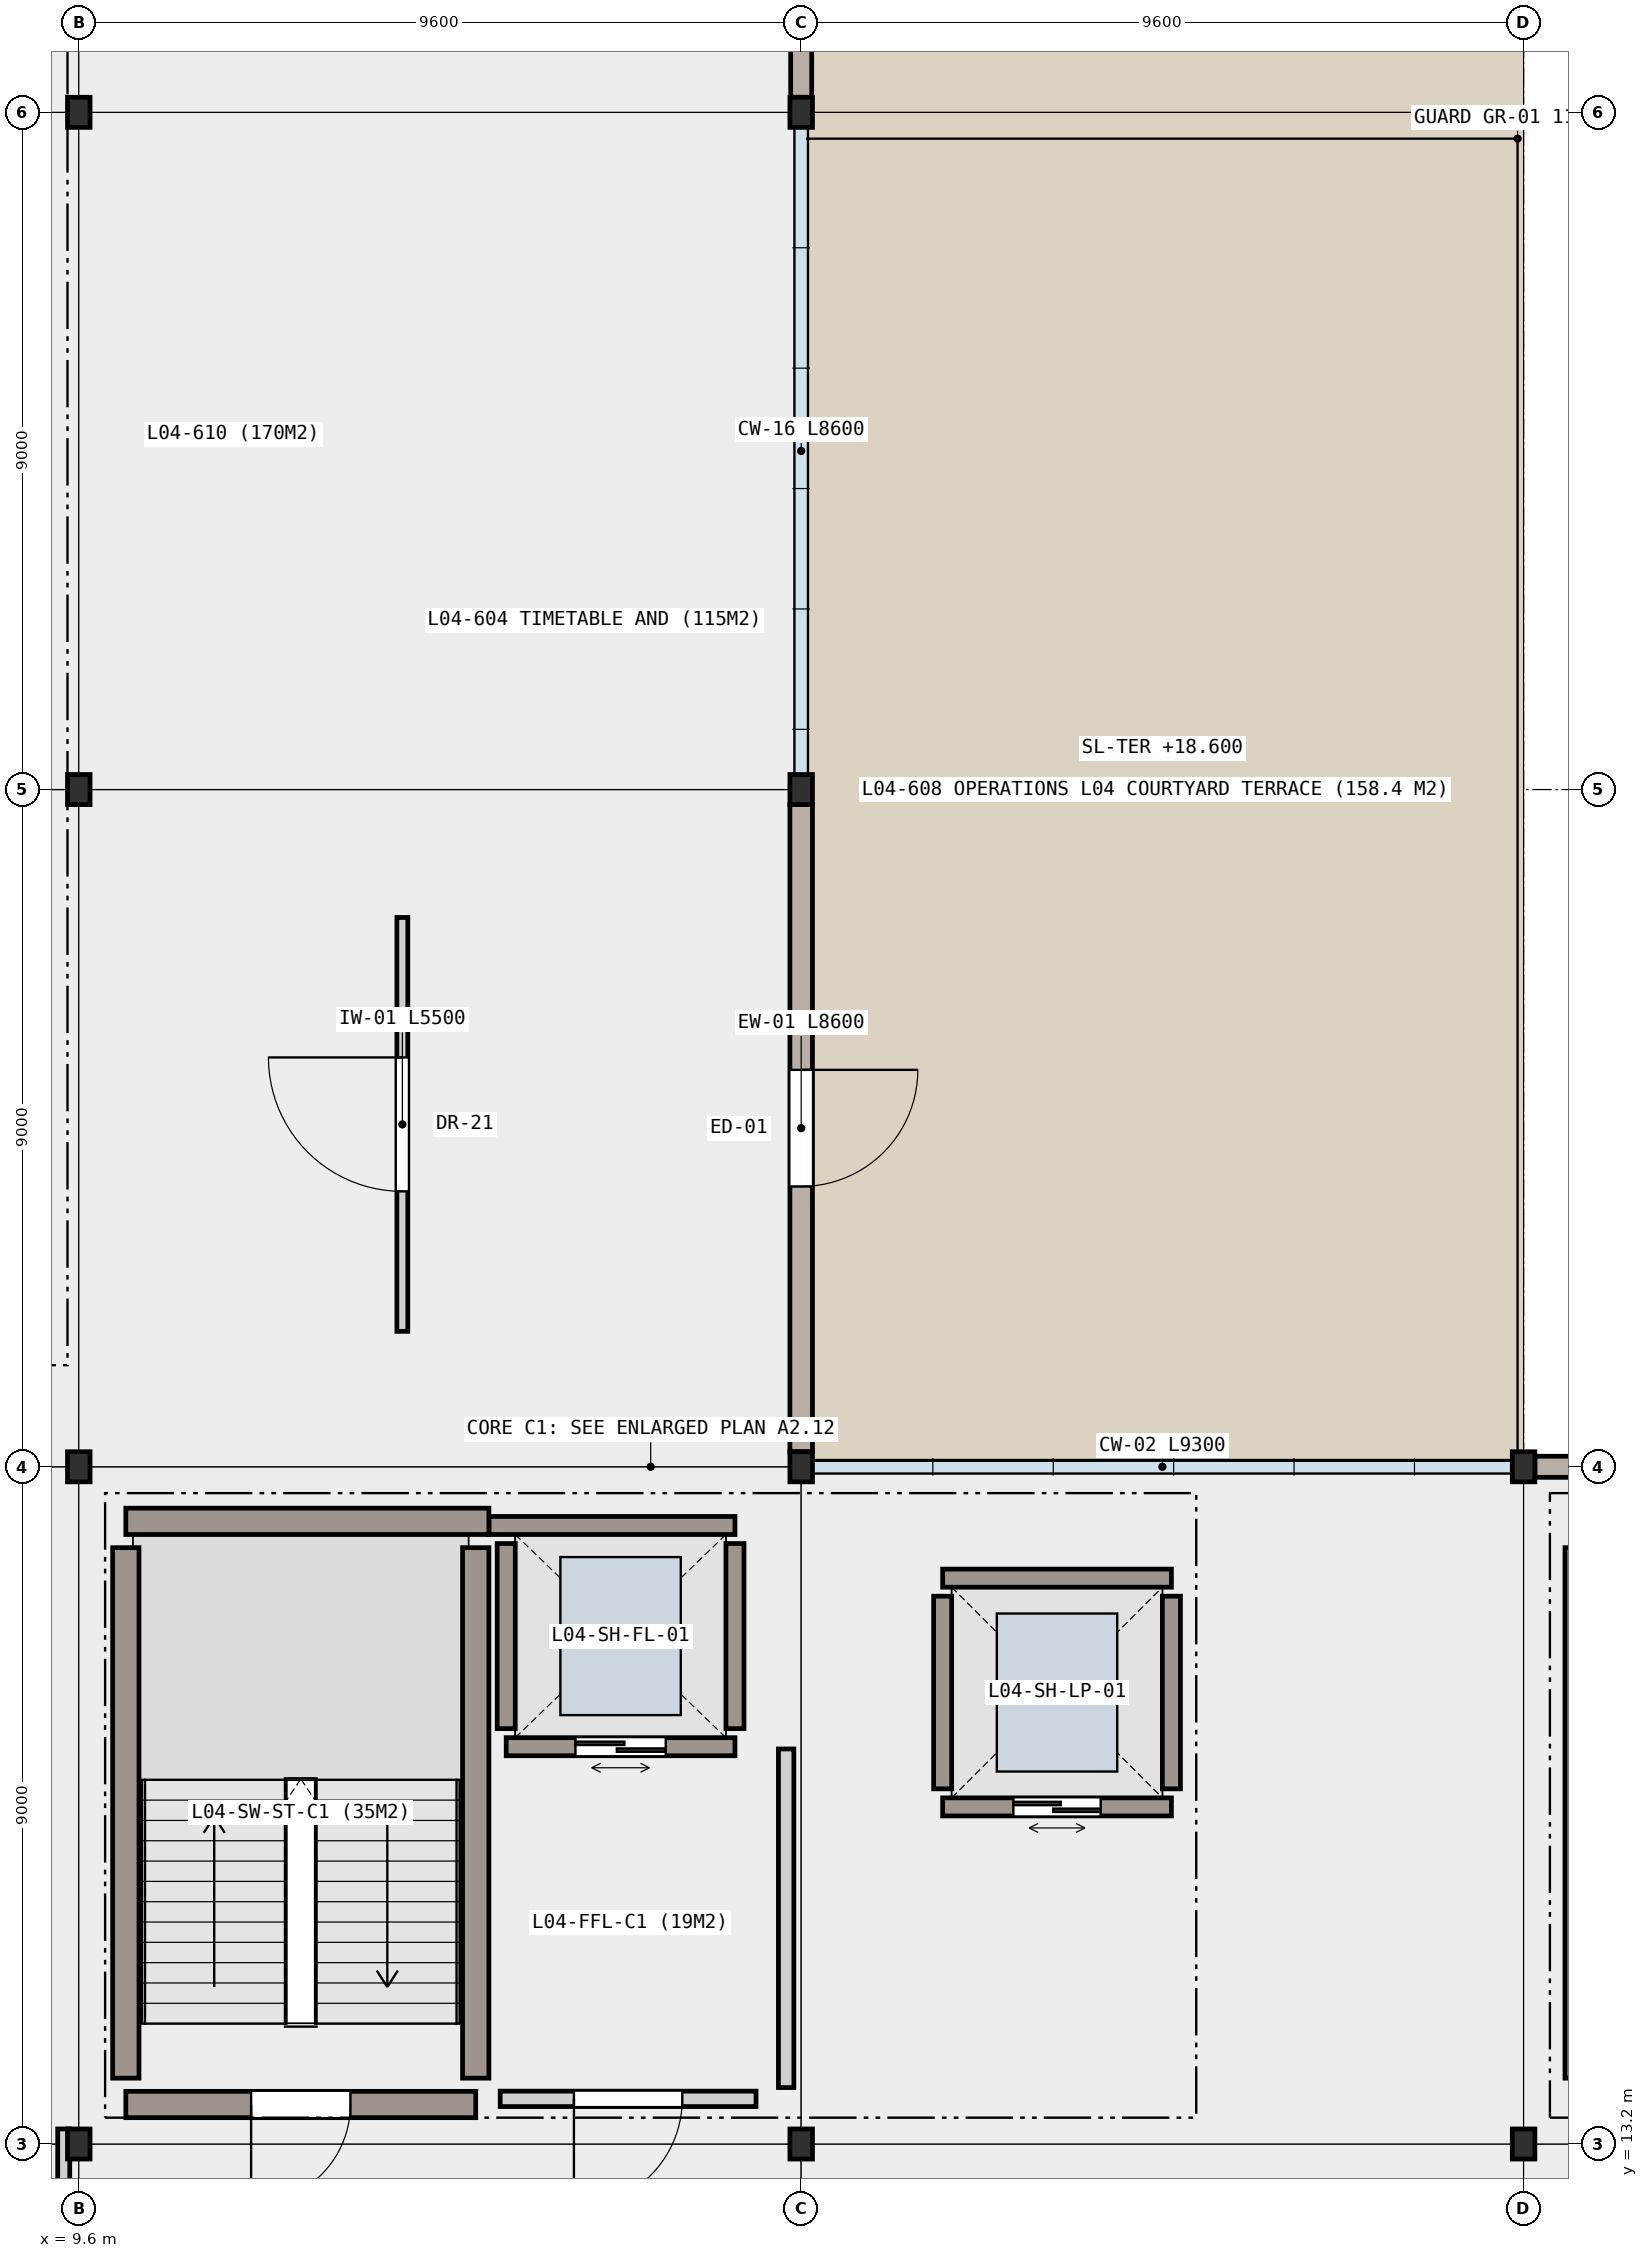
"""IFC4 building model, lengths in metres.
Left out: names, types, materials, properties, quantities, classifications, styles, units other than length and angle.
Written with IfcOpenShell. Run it as: python <this file> out.ifc"""

import sys

from ifc_helpers import new_model, si_unit, direction, frame, frame_2d, origin, origin_2d, place, context, subcontext, project, spatial, rectangle, i_section, extrude, element, fill, save


model = new_model("IFC4")
c1 = context("Model", 3, precision=1e-05, world=origin(), true_north=direction((0.0, 1.0)))
c2 = subcontext(c1, "Body", "Model", "MODEL_VIEW")
j1 = project(units=[si_unit("LENGTHUNIT", "METRE"), si_unit("PLANEANGLEUNIT", "RADIAN")], contexts=[c1])
p1 = place(None, origin())
s1 = spatial("IfcSite", under=j1, at=p1, CompositionType="ELEMENT")
p2 = place(p1, origin())
s2 = spatial("IfcBuilding", under=s1, at=p2, CompositionType="ELEMENT")
p3 = place(p2, frame((0.0, 0.0, 18.6)))
s3 = spatial("IfcBuildingStorey", under=s2, at=p3, CompositionType="ELEMENT", Elevation=18.6)
for number, where, z_axis, x_axis in (
    (1, (9.6, 13.2, 0.0), (0.0, 0.0, 1.0), (1.0, 0.0, 0.0)),
    (2, (9.6, 22.2, 0.0), (0.0, 0.0, 1.0), (1.0, 0.0, 0.0)),
    (3, (9.6, 31.2, 0.0), (0.0, 0.0, 1.0), (1.0, 0.0, 0.0)),
    (4, (9.6, 40.2, 0.0), (0.0, 0.0, 1.0), (1.0, 0.0, 0.0)),
    (5, (19.2, 13.2, 0.0), (0.0, 0.0, 1.0), (1.0, 0.0, 0.0)),
    (6, (19.2, 22.2, 0.0), (0.0, 0.0, 1.0), (1.0, 0.0, 0.0)),
    (7, (19.2, 31.2, 0.0), (0.0, 0.0, 1.0), (1.0, 0.0, 0.0)),
    (8, (19.2, 40.2, 0.0), (0.0, 0.0, 1.0), (1.0, 0.0, 0.0)),
    (9, (28.8, 13.2, 0.0), (0.0, 0.0, 1.0), (1.0, 0.0, 0.0)),
    (10, (28.8, 22.2, 0.0), (0.0, 0.0, 1.0), (1.0, 0.0, 0.0)),
):
    element("IfcColumn", number, at=place(p3, frame(where, z_axis=z_axis, x_axis=x_axis)), inside=s3, PredefinedType="COLUMN", context=c2, shape_type="SweptSolid", body=[
        extrude(i_section(OverallWidth=0.3, OverallDepth=0.4, WebThickness=0.013, FlangeThickness=0.024, FilletRadius=0.027, at=origin_2d()), origin(), (0.0, 0.0, 1.0), 4.2),
    ])
p4 = place(p3, frame((19.2, 49.0, 0.0), z_axis=(0.0, 0.0, 1.0), x_axis=(0.0, -1.0, 0.0)))
e11 = element("IfcWall", 11, at=p4, inside=s3, PredefinedType="SOLIDWALL", context=c2, shape_type="SweptSolid", body=[
    extrude(rectangle(XDim=8.6, YDim=0.28, at=frame_2d((4.3, 0.0))), origin(), (0.0, 0.0, 1.0), 3.38),
])
p5 = place(p4, frame((0.75, 0.0, 0.85)))
e12 = element("IfcOpeningElement", 12, at=p5, cuts=e11, PredefinedType="OPENING", context=c2, shape_type="SweptSolid", body=[
    extrude(rectangle(XDim=2.8, YDim=1.5, at=frame_2d((1.4, 0.75))), frame((0.0, 0.15, 0.0), z_axis=(0.0, -1.0, 0.0), x_axis=(1.0, 0.0, 0.0)), (0.0, 0.0, 1.0), 0.3),
])
p6 = place(p4, frame((5.05, 0.0, 0.85)))
e13 = element("IfcOpeningElement", 13, at=p6, cuts=e11, PredefinedType="OPENING", context=c2, shape_type="SweptSolid", body=[
    extrude(rectangle(XDim=2.8, YDim=1.85, at=frame_2d((1.4, 0.925))), frame((0.0, 0.15, 0.0), z_axis=(0.0, -1.0, 0.0), x_axis=(1.0, 0.0, 0.0)), (0.0, 0.0, 1.0), 0.3),
])
p7 = place(p3, frame((19.2, 31.0, 0.0), z_axis=(0.0, 0.0, 1.0), x_axis=(0.0, -1.0, 0.0)))
e14 = element("IfcWall", 14, at=p7, inside=s3, PredefinedType="SOLIDWALL", context=c2, shape_type="SweptSolid", body=[
    extrude(rectangle(XDim=8.6, YDim=0.3, at=frame_2d((4.3, 0.0))), origin(), (0.0, 0.0, 1.0), 3.38),
])
p8 = place(p7, frame((3.525, 0.0, 0.0)))
e15 = element("IfcOpeningElement", 15, at=p8, cuts=e14, PredefinedType="OPENING", context=c2, shape_type="SweptSolid", body=[
    extrude(rectangle(XDim=1.55, YDim=2.25, at=frame_2d((0.775, 1.125))), frame((0.0, 0.16, 0.0), z_axis=(0.0, -1.0, 0.0), x_axis=(1.0, 0.0, 0.0)), (0.0, 0.0, 1.0), 0.32),
])
p9 = place(p3, frame((28.95, 22.2, 0.0), z_axis=(0.0, 0.0, 1.0), x_axis=(1.0, 0.0, 0.0)))
e16 = element("IfcWall", 16, at=p9, inside=s3, PredefinedType="SOLIDWALL", context=c2, shape_type="SweptSolid", body=[
    extrude(rectangle(XDim=9.3, YDim=0.28, at=frame_2d((4.65, 0.0))), origin(), (0.0, 0.0, 1.0), 3.33),
])
p10 = place(p9, frame((0.925, 0.0, 0.85)))
e17 = element("IfcOpeningElement", 17, at=p10, cuts=e16, PredefinedType="OPENING", context=c2, shape_type="SweptSolid", body=[
    extrude(rectangle(XDim=2.8, YDim=2.15, at=frame_2d((1.4, 1.075))), frame((0.0, 0.15, 0.0), z_axis=(0.0, -1.0, 0.0), x_axis=(1.0, 0.0, 0.0)), (0.0, 0.0, 1.0), 0.3),
])
p11 = place(p9, frame((5.5, 0.0, 0.85)))
e18 = element("IfcOpeningElement", 18, at=p11, cuts=e16, PredefinedType="OPENING", context=c2, shape_type="SweptSolid", body=[
    extrude(rectangle(XDim=2.95, YDim=1.5, at=frame_2d((1.475, 0.75))), frame((0.0, 0.15, 0.0), z_axis=(0.0, -1.0, 0.0), x_axis=(1.0, 0.0, 0.0)), (0.0, 0.0, 1.0), 0.3),
])
p12 = place(p3, frame((18.32, 18.48, 0.0), z_axis=(0.0, 0.0, 1.0), x_axis=(-1.0, 0.0, 0.0)))
e19 = element("IfcWall", 19, at=p12, inside=s3, PredefinedType="SHEAR", context=c2, shape_type="SweptSolid", body=[
    extrude(rectangle(XDim=3.04, YDim=0.24, at=frame_2d((1.52, 0.0))), origin(), (0.0, 0.0, 1.0), 3.96),
])
p13 = place(p12, frame((0.92, 0.0, 0.0)))
e20 = element("IfcOpeningElement", 20, at=p13, cuts=e19, PredefinedType="OPENING", context=c2, shape_type="SweptSolid", body=[
    extrude(rectangle(XDim=1.2, YDim=2.15, at=frame_2d((0.6, 1.075))), frame((0.0, 0.13, 0.0), z_axis=(0.0, -1.0, 0.0), x_axis=(1.0, 0.0, 0.0)), (0.0, 0.0, 1.0), 0.26),
])
p14 = place(p3, frame((15.05, 21.42, 0.0), z_axis=(0.0, 0.0, 1.0), x_axis=(1.0, 0.0, 0.0)))
e21 = element("IfcWall", 21, at=p14, inside=s3, PredefinedType="SHEAR", context=c2, shape_type="SweptSolid", body=[
    extrude(rectangle(XDim=3.27, YDim=0.24, at=frame_2d((1.635, 0.0))), origin(), (0.0, 0.0, 1.0), 3.96),
])
for number, where, z_axis, x_axis in (
    (22, (15.28, 18.72, 0.0), (0.0, 0.0, 1.0), (0.0, 1.0, 0.0)),
    (23, (18.32, 21.18, 0.0), (0.0, 0.0, 1.0), (0.0, -1.0, 0.0)),
):
    element("IfcWall", number, at=place(p3, frame(where, z_axis=z_axis, x_axis=x_axis)), inside=s3, PredefinedType="SHEAR", context=c2, shape_type="SweptSolid", body=[
        extrude(rectangle(XDim=2.46, YDim=0.24, at=frame_2d((1.23, 0.0))), origin(), (0.0, 0.0, 1.0), 3.96),
    ])
p15 = place(p3, frame((24.12, 17.68, 0.0), z_axis=(0.0, 0.0, 1.0), x_axis=(-1.0, 0.0, 0.0)))
e24 = element("IfcWall", 24, at=p15, inside=s3, PredefinedType="SHEAR", context=c2, shape_type="SweptSolid", body=[
    extrude(rectangle(XDim=3.04, YDim=0.24, at=frame_2d((1.52, 0.0))), origin(), (0.0, 0.0, 1.0), 3.96),
])
p16 = place(p15, frame((0.94, 0.0, 0.0)))
e25 = element("IfcOpeningElement", 25, at=p16, cuts=e24, PredefinedType="OPENING", context=c2, shape_type="SweptSolid", body=[
    extrude(rectangle(XDim=1.16, YDim=2.15, at=frame_2d((0.58, 1.075))), frame((0.0, 0.13, 0.0), z_axis=(0.0, -1.0, 0.0), x_axis=(1.0, 0.0, 0.0)), (0.0, 0.0, 1.0), 0.26),
])
p17 = place(p3, frame((21.08, 20.72, 0.0), z_axis=(0.0, 0.0, 1.0), x_axis=(1.0, 0.0, 0.0)))
e26 = element("IfcWall", 26, at=p17, inside=s3, PredefinedType="SHEAR", context=c2, shape_type="SweptSolid", body=[
    extrude(rectangle(XDim=3.04, YDim=0.24, at=frame_2d((1.52, 0.0))), origin(), (0.0, 0.0, 1.0), 3.96),
])
for number, where, z_axis, x_axis in (
    (27, (21.08, 17.92, 0.0), (0.0, 0.0, 1.0), (0.0, 1.0, 0.0)),
    (28, (24.12, 20.48, 0.0), (0.0, 0.0, 1.0), (0.0, -1.0, 0.0)),
):
    element("IfcWall", number, at=place(p3, frame(where, z_axis=z_axis, x_axis=x_axis)), inside=s3, PredefinedType="SHEAR", context=c2, shape_type="SweptSolid", body=[
        extrude(rectangle(XDim=2.56, YDim=0.24, at=frame_2d((1.28, 0.0))), origin(), (0.0, 0.0, 1.0), 3.96),
    ])
p18 = place(p3, frame((14.875, 13.725, 0.0), z_axis=(0.0, 0.0, 1.0), x_axis=(-1.0, 0.0, 0.0)))
e29 = element("IfcWall", 29, at=p18, inside=s3, PredefinedType="SHEAR", context=c2, shape_type="SweptSolid", body=[
    extrude(rectangle(XDim=4.65, YDim=0.35, at=frame_2d((2.325, 0.0))), origin(), (0.0, 0.0, 1.0), 3.96),
])
p19 = place(p18, frame((1.665, 0.0, 0.0)))
e30 = element("IfcOpeningElement", 30, at=p19, cuts=e29, PredefinedType="OPENING", context=c2, shape_type="SweptSolid", body=[
    extrude(rectangle(XDim=1.32, YDim=2.15, at=frame_2d((0.66, 1.075))), frame((0.0, 0.185, 0.0), z_axis=(0.0, -1.0, 0.0), x_axis=(1.0, 0.0, 0.0)), (0.0, 0.0, 1.0), 0.37),
])
p20 = place(p3, frame((10.225, 21.475, 0.0), z_axis=(0.0, 0.0, 1.0), x_axis=(1.0, 0.0, 0.0)))
e31 = element("IfcWall", 31, at=p20, inside=s3, PredefinedType="SHEAR", context=c2, shape_type="SweptSolid", body=[
    extrude(rectangle(XDim=4.825, YDim=0.35, at=frame_2d((2.413, 0.0))), origin(), (0.0, 0.0, 1.0), 3.96),
])
for number, where, z_axis, x_axis in (
    (32, (10.225, 14.075, 0.0), (0.0, 0.0, 1.0), (0.0, 1.0, 0.0)),
    (33, (14.875, 21.125, 0.0), (0.0, 0.0, 1.0), (0.0, -1.0, 0.0)),
    (34, (29.525, 14.075, 0.0), (0.0, 0.0, 1.0), (0.0, 1.0, 0.0)),
):
    element("IfcWall", number, at=place(p3, frame(where, z_axis=z_axis, x_axis=x_axis)), inside=s3, PredefinedType="SHEAR", context=c2, shape_type="SweptSolid", body=[
        extrude(rectangle(XDim=7.05, YDim=0.35, at=frame_2d((3.525, 0.0))), origin(), (0.0, 0.0, 1.0), 3.96),
    ])
p21 = place(p3, frame((18.6, 13.8, 0.0), z_axis=(0.0, 0.0, 1.0), x_axis=(-1.0, 0.0, 0.0)))
e35 = element("IfcWall", 35, at=p21, inside=s3, PredefinedType="PARTITIONING", context=c2, shape_type="SweptSolid", body=[
    extrude(rectangle(XDim=3.4, YDim=0.205, at=frame_2d((1.7, 0.0))), origin(), (0.0, 0.0, 1.0), 3.96),
])
p22 = place(p21, frame((0.98, 0.0, 0.0)))
e36 = element("IfcOpeningElement", 36, at=p22, cuts=e35, PredefinedType="OPENING", context=c2, shape_type="SweptSolid", body=[
    extrude(rectangle(XDim=1.44, YDim=2.18, at=frame_2d((0.72, 1.09))), frame((0.0, 0.113, 0.0), z_axis=(0.0, -1.0, 0.0), x_axis=(1.0, 0.0, 0.0)), (0.0, 0.0, 1.0), 0.225),
])
p23 = place(p3, frame((19.0, 18.45, 0.0), z_axis=(0.0, 0.0, 1.0), x_axis=(0.0, -1.0, 0.0)))
e37 = element("IfcWall", 37, at=p23, inside=s3, PredefinedType="PARTITIONING", context=c2, shape_type="SweptSolid", body=[
    extrude(rectangle(XDim=4.5, YDim=0.205, at=frame_2d((2.25, 0.0))), origin(), (0.0, 0.0, 1.0), 3.38),
])
p24 = place(p3, frame((9.4, 13.4, 0.0), z_axis=(0.0, 0.0, 1.0), x_axis=(0.0, -1.0, 0.0)))
e38 = element("IfcWall", 38, at=p24, inside=s3, PredefinedType="PARTITIONING", context=c2, shape_type="SweptSolid", body=[
    extrude(rectangle(XDim=3.4, YDim=0.16, at=frame_2d((1.7, 0.0))), origin(), (0.0, 0.0, 1.0), 3.43),
])
p25 = place(p24, frame((0.85, 0.0, 0.0)))
e39 = element("IfcOpeningElement", 39, at=p25, cuts=e38, PredefinedType="OPENING", context=c2, shape_type="SweptSolid", body=[
    extrude(rectangle(XDim=1.7, YDim=2.22, at=frame_2d((0.85, 1.11))), frame((0.0, 0.09, 0.0), z_axis=(0.0, -1.0, 0.0), x_axis=(1.0, 0.0, 0.0)), (0.0, 0.0, 1.0), 0.18),
])
p26 = place(p3, frame((13.9, 24.0, 0.0), z_axis=(0.0, 0.0, 1.0), x_axis=(0.0, 1.0, 0.0)))
e40 = element("IfcWall", 40, at=p26, inside=s3, PredefinedType="PARTITIONING", context=c2, shape_type="SweptSolid", body=[
    extrude(rectangle(XDim=5.5, YDim=0.145, at=frame_2d((2.75, 0.0))), origin(), (0.0, 0.0, 1.0), 3.96),
])
p27 = place(p26, frame((1.86, 0.0, 0.0)))
e41 = element("IfcOpeningElement", 41, at=p27, cuts=e40, PredefinedType="OPENING", context=c2, shape_type="SweptSolid", body=[
    extrude(rectangle(XDim=1.78, YDim=2.24, at=frame_2d((0.89, 1.12))), frame((0.0, 0.083, 0.0), z_axis=(0.0, -1.0, 0.0), x_axis=(1.0, 0.0, 0.0)), (0.0, 0.0, 1.0), 0.165),
])
p28 = place(p8, origin())
e42 = element("IfcDoor", 42, at=p28, inside=s3, OperationType="SINGLE_SWING_LEFT", PredefinedType="DOOR", context=c2, shape_type="SweptSolid", body=[
    extrude(rectangle(XDim=1.55, YDim=2.25, at=frame_2d((0.775, 1.125))), frame((0.0, 0.025, 0.0), z_axis=(0.0, -1.0, 0.0), x_axis=(1.0, 0.0, 0.0)), (0.0, 0.0, 1.0), 0.05),
])
fill(e15, e42)
p29 = place(p13, origin())
e43 = element("IfcDoor", 43, at=p29, inside=s3, OperationType="DOUBLE_DOOR_SLIDING", PredefinedType="DOOR", context=c2, shape_type="SweptSolid", body=[
    extrude(rectangle(XDim=1.2, YDim=2.15, at=frame_2d((0.6, 1.075))), frame((0.0, 0.025, 0.0), z_axis=(0.0, -1.0, 0.0), x_axis=(1.0, 0.0, 0.0)), (0.0, 0.0, 1.0), 0.05),
])
fill(e20, e43)
p30 = place(p16, origin())
e44 = element("IfcDoor", 44, at=p30, inside=s3, OperationType="DOUBLE_DOOR_SLIDING", PredefinedType="DOOR", context=c2, shape_type="SweptSolid", body=[
    extrude(rectangle(XDim=1.16, YDim=2.15, at=frame_2d((0.58, 1.075))), frame((0.0, 0.025, 0.0), z_axis=(0.0, -1.0, 0.0), x_axis=(1.0, 0.0, 0.0)), (0.0, 0.0, 1.0), 0.05),
])
fill(e25, e44)
p31 = place(p19, origin())
e45 = element("IfcDoor", 45, at=p31, inside=s3, OperationType="SINGLE_SWING_RIGHT", PredefinedType="DOOR", context=c2, shape_type="SweptSolid", body=[
    extrude(rectangle(XDim=1.32, YDim=2.15, at=frame_2d((0.66, 1.075))), frame((0.0, 0.025, 0.0), z_axis=(0.0, -1.0, 0.0), x_axis=(1.0, 0.0, 0.0)), (0.0, 0.0, 1.0), 0.05),
])
fill(e30, e45)
p32 = place(p22, origin())
e46 = element("IfcDoor", 46, at=p32, inside=s3, OperationType="SINGLE_SWING_RIGHT", PredefinedType="DOOR", context=c2, shape_type="SweptSolid", body=[
    extrude(rectangle(XDim=1.44, YDim=2.18, at=frame_2d((0.72, 1.09))), frame((0.0, 0.025, 0.0), z_axis=(0.0, -1.0, 0.0), x_axis=(1.0, 0.0, 0.0)), (0.0, 0.0, 1.0), 0.05),
])
fill(e36, e46)
p33 = place(p27, origin())
e47 = element("IfcDoor", 47, at=p33, inside=s3, OperationType="SINGLE_SWING_RIGHT", PredefinedType="DOOR", context=c2, shape_type="SweptSolid", body=[
    extrude(rectangle(XDim=1.78, YDim=2.24, at=frame_2d((0.89, 1.12))), frame((0.0, 0.025, 0.0), z_axis=(0.0, -1.0, 0.0), x_axis=(1.0, 0.0, 0.0)), (0.0, 0.0, 1.0), 0.05),
])
fill(e41, e47)
save(model, sys.argv[1])
